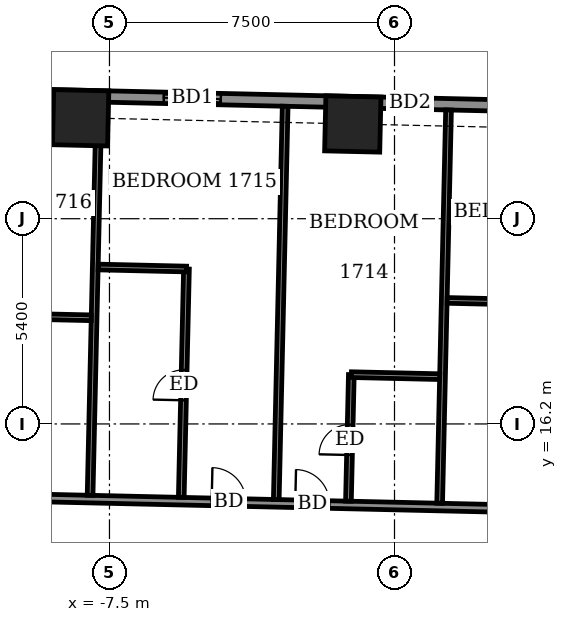
"""IFC4 building model, lengths in metres.
Left out: names, types, materials, properties, quantities, classifications, styles, units other than length and angle.
Written with IfcOpenShell. Run it as: python <this file> out.ifc"""

import sys

from ifc_helpers import new_model, si_unit, direction, frame, frame_2d, origin, origin_2d, place, context, subcontext, project, spatial, rectangle, extrude, element, fill, save


model = new_model("IFC4")
c1 = context("Model", 3, precision=1e-05, world=origin(), true_north=direction((0.0, 1.0)))
c2 = subcontext(c1, "Body", "Model", "MODEL_VIEW")
j1 = project(units=[si_unit("LENGTHUNIT", "METRE"), si_unit("PLANEANGLEUNIT", "RADIAN")], contexts=[c1])
p1 = place(None, origin())
s1 = spatial("IfcSite", under=j1, at=p1, CompositionType="ELEMENT")
p2 = place(p1, origin())
s2 = spatial("IfcBuilding", under=s1, at=p2, CompositionType="ELEMENT")
p3 = place(p2, frame((0.0, 0.0, 71.1)))
s3 = spatial("IfcBuildingStorey", under=s2, at=p3, CompositionType="ELEMENT", Elevation=71.1)
for number, where, z_axis, x_axis in (
    (1, (-1.097, 24.093, -0.55), (0.0, 0.0, 1.0), (-1.0, 0.023, 0.0)),
    (2, (-8.259, 24.255, -0.55), (0.0, 0.0, 1.0), (-1.0, 0.023, 0.0)),
):
    element("IfcColumn", number, at=place(p3, frame(where, z_axis=z_axis, x_axis=x_axis)), inside=s3, PredefinedType="COLUMN", context=c2, shape_type="SweptSolid", body=[
        extrude(rectangle(XDim=1.45, YDim=1.45, at=origin_2d()), origin(), (0.0, 0.0, 1.0), 3.6),
    ])
p4 = place(p3, frame((27.407, 24.021, 0.0), z_axis=(0.0, 0.0, 1.0), x_axis=(-0.99974239923, 0.022696589664, 0.0)))
e3 = element("IfcWall", 3, at=p4, inside=s3, PredefinedType="SOLIDWALL", context=c2, shape_type="SweptSolid", body=[
    extrude(rectangle(XDim=49.836, YDim=0.3, at=frame_2d((24.918, 0.0))), origin(), (0.0, 0.0, 1.0), 3.05),
])
p5 = place(p4, frame((2.998, 0.0, 0.0)))
e4 = element("IfcOpeningElement", 4, at=p5, cuts=e3, PredefinedType="OPENING", context=c2, shape_type="SweptSolid", body=[
    extrude(rectangle(XDim=1.5, YDim=2.4, at=frame_2d((0.75, 1.2))), frame((0.0, 0.16, 0.0), z_axis=(0.0, -1.0, 0.0), x_axis=(1.0, 0.0, 0.0)), (0.0, 0.0, 1.0), 0.32),
])
p6 = place(p4, frame((9.086, 0.0, 0.0)))
e5 = element("IfcOpeningElement", 5, at=p6, cuts=e3, PredefinedType="OPENING", context=c2, shape_type="SweptSolid", body=[
    extrude(rectangle(XDim=1.5, YDim=2.4, at=frame_2d((0.75, 1.2))), frame((0.0, 0.16, 0.0), z_axis=(0.0, -1.0, 0.0), x_axis=(1.0, 0.0, 0.0)), (0.0, 0.0, 1.0), 0.32),
])
p7 = place(p4, frame((15.017, 0.0, 0.0)))
e6 = element("IfcOpeningElement", 6, at=p7, cuts=e3, PredefinedType="OPENING", context=c2, shape_type="SweptSolid", body=[
    extrude(rectangle(XDim=1.5, YDim=2.4, at=frame_2d((0.75, 1.2))), frame((0.0, 0.16, 0.0), z_axis=(0.0, -1.0, 0.0), x_axis=(1.0, 0.0, 0.0)), (0.0, 0.0, 1.0), 0.32),
])
p8 = place(p4, frame((18.124, 0.0, 0.0)))
e7 = element("IfcOpeningElement", 7, at=p8, cuts=e3, PredefinedType="OPENING", context=c2, shape_type="SweptSolid", body=[
    extrude(rectangle(XDim=1.5, YDim=2.4, at=frame_2d((0.75, 1.2))), frame((0.0, 0.16, 0.0), z_axis=(0.0, -1.0, 0.0), x_axis=(1.0, 0.0, 0.0)), (0.0, 0.0, 1.0), 0.32),
])
p9 = place(p4, frame((23.149, 0.0, 0.0)))
e8 = element("IfcOpeningElement", 8, at=p9, cuts=e3, PredefinedType="OPENING", context=c2, shape_type="SweptSolid", body=[
    extrude(rectangle(XDim=1.5, YDim=2.4, at=frame_2d((0.75, 1.2))), frame((0.0, 0.16, 0.0), z_axis=(0.0, -1.0, 0.0), x_axis=(1.0, 0.0, 0.0)), (0.0, 0.0, 1.0), 0.32),
])
p10 = place(p4, frame((26.405, 0.0, 0.0)))
e9 = element("IfcOpeningElement", 9, at=p10, cuts=e3, PredefinedType="OPENING", context=c2, shape_type="SweptSolid", body=[
    extrude(rectangle(XDim=1.2, YDim=2.4, at=frame_2d((0.6, 1.2))), frame((0.0, 0.16, 0.0), z_axis=(0.0, -1.0, 0.0), x_axis=(1.0, 0.0, 0.0)), (0.0, 0.0, 1.0), 0.32),
])
p11 = place(p4, frame((31.986, 0.0, 0.0)))
e10 = element("IfcOpeningElement", 10, at=p11, cuts=e3, PredefinedType="OPENING", context=c2, shape_type="SweptSolid", body=[
    extrude(rectangle(XDim=1.5, YDim=2.4, at=frame_2d((0.75, 1.2))), frame((0.0, 0.16, 0.0), z_axis=(0.0, -1.0, 0.0), x_axis=(1.0, 0.0, 0.0)), (0.0, 0.0, 1.0), 0.32),
])
p12 = place(p4, frame((37.211, 0.0, 0.0)))
e11 = element("IfcOpeningElement", 11, at=p12, cuts=e3, PredefinedType="OPENING", context=c2, shape_type="SweptSolid", body=[
    extrude(rectangle(XDim=1.5, YDim=2.4, at=frame_2d((0.75, 1.2))), frame((0.0, 0.16, 0.0), z_axis=(0.0, -1.0, 0.0), x_axis=(1.0, 0.0, 0.0)), (0.0, 0.0, 1.0), 0.32),
])
p13 = place(p4, frame((40.317, 0.0, 0.0)))
e12 = element("IfcOpeningElement", 12, at=p13, cuts=e3, PredefinedType="OPENING", context=c2, shape_type="SweptSolid", body=[
    extrude(rectangle(XDim=1.5, YDim=2.4, at=frame_2d((0.75, 1.2))), frame((0.0, 0.16, 0.0), z_axis=(0.0, -1.0, 0.0), x_axis=(1.0, 0.0, 0.0)), (0.0, 0.0, 1.0), 0.32),
])
p14 = place(p4, frame((45.431, 0.0, 0.9)))
e13 = element("IfcOpeningElement", 13, at=p14, cuts=e3, PredefinedType="OPENING", context=c2, shape_type="SweptSolid", body=[
    extrude(rectangle(XDim=2.4, YDim=1.5, at=frame_2d((1.2, 0.75))), frame((0.0, 0.16, 0.0), z_axis=(0.0, -1.0, 0.0), x_axis=(1.0, 0.0, 0.0)), (0.0, 0.0, 1.0), 0.32),
])
p15 = place(p3, frame((-25.481, 14.619, 0.0), z_axis=(0.0, 0.0, 1.0), x_axis=(0.999742349682, -0.022698772048, 0.0)))
e14 = element("IfcWall", 14, at=p15, inside=s3, PredefinedType="PARTITIONING", context=c2, shape_type="SweptSolid", body=[
    extrude(rectangle(XDim=54.886, YDim=0.2, at=frame_2d((27.443, 0.0))), origin(), (0.0, 0.0, 1.0), 3.05),
])
p16 = place(p15, frame((52.093, 0.0, 0.0)))
e15 = element("IfcOpeningElement", 15, at=p16, cuts=e14, PredefinedType="OPENING", context=c2, shape_type="SweptSolid", body=[
    extrude(rectangle(XDim=1.0, YDim=2.1, at=frame_2d((0.5, 1.05))), frame((0.0, 0.11, 0.0), z_axis=(0.0, -1.0, 0.0), x_axis=(1.0, 0.0, 0.0)), (0.0, 0.0, 1.0), 0.22),
])
p17 = place(p15, frame((46.325, 0.0, 0.0)))
e16 = element("IfcOpeningElement", 16, at=p17, cuts=e14, PredefinedType="OPENING", context=c2, shape_type="SweptSolid", body=[
    extrude(rectangle(XDim=0.9, YDim=2.1, at=frame_2d((0.45, 1.05))), frame((0.0, 0.11, 0.0), z_axis=(0.0, -1.0, 0.0), x_axis=(1.0, 0.0, 0.0)), (0.0, 0.0, 1.0), 0.22),
])
p18 = place(p15, frame((41.275, 0.0, 0.0)))
e17 = element("IfcOpeningElement", 17, at=p18, cuts=e14, PredefinedType="OPENING", context=c2, shape_type="SweptSolid", body=[
    extrude(rectangle(XDim=0.9, YDim=2.1, at=frame_2d((0.45, 1.05))), frame((0.0, 0.11, 0.0), z_axis=(0.0, -1.0, 0.0), x_axis=(1.0, 0.0, 0.0)), (0.0, 0.0, 1.0), 0.22),
])
p19 = place(p15, frame((38.875, 0.0, 0.0)))
e18 = element("IfcOpeningElement", 18, at=p19, cuts=e14, PredefinedType="OPENING", context=c2, shape_type="SweptSolid", body=[
    extrude(rectangle(XDim=0.9, YDim=2.1, at=frame_2d((0.45, 1.05))), frame((0.0, 0.11, 0.0), z_axis=(0.0, -1.0, 0.0), x_axis=(1.0, 0.0, 0.0)), (0.0, 0.0, 1.0), 0.22),
])
p20 = place(p15, frame((31.95, 0.0, 0.0)))
e19 = element("IfcOpeningElement", 19, at=p20, cuts=e14, PredefinedType="OPENING", context=c2, shape_type="SweptSolid", body=[
    extrude(rectangle(XDim=0.9, YDim=2.1, at=frame_2d((0.45, 1.05))), frame((0.0, 0.11, 0.0), z_axis=(0.0, -1.0, 0.0), x_axis=(1.0, 0.0, 0.0)), (0.0, 0.0, 1.0), 0.22),
])
p21 = place(p15, frame((29.8, 0.0, 0.0)))
e20 = element("IfcOpeningElement", 20, at=p21, cuts=e14, PredefinedType="OPENING", context=c2, shape_type="SweptSolid", body=[
    extrude(rectangle(XDim=0.9, YDim=2.1, at=frame_2d((0.45, 1.05))), frame((0.0, 0.11, 0.0), z_axis=(0.0, -1.0, 0.0), x_axis=(1.0, 0.0, 0.0)), (0.0, 0.0, 1.0), 0.22),
])
p22 = place(p15, frame((22.875, 0.0, 0.0)))
e21 = element("IfcOpeningElement", 21, at=p22, cuts=e14, PredefinedType="OPENING", context=c2, shape_type="SweptSolid", body=[
    extrude(rectangle(XDim=0.9, YDim=2.1, at=frame_2d((0.45, 1.05))), frame((0.0, 0.11, 0.0), z_axis=(0.0, -1.0, 0.0), x_axis=(1.0, 0.0, 0.0)), (0.0, 0.0, 1.0), 0.22),
])
p23 = place(p15, frame((20.675, 0.0, 0.0)))
e22 = element("IfcOpeningElement", 22, at=p23, cuts=e14, PredefinedType="OPENING", context=c2, shape_type="SweptSolid", body=[
    extrude(rectangle(XDim=0.9, YDim=2.1, at=frame_2d((0.45, 1.05))), frame((0.0, 0.11, 0.0), z_axis=(0.0, -1.0, 0.0), x_axis=(1.0, 0.0, 0.0)), (0.0, 0.0, 1.0), 0.22),
])
p24 = place(p15, frame((13.525, 0.0, 0.0)))
e23 = element("IfcOpeningElement", 23, at=p24, cuts=e14, PredefinedType="OPENING", context=c2, shape_type="SweptSolid", body=[
    extrude(rectangle(XDim=0.9, YDim=2.1, at=frame_2d((0.45, 1.05))), frame((0.0, 0.11, 0.0), z_axis=(0.0, -1.0, 0.0), x_axis=(1.0, 0.0, 0.0)), (0.0, 0.0, 1.0), 0.22),
])
p25 = place(p15, frame((11.275, 0.0, 0.0)))
e24 = element("IfcOpeningElement", 24, at=p25, cuts=e14, PredefinedType="OPENING", context=c2, shape_type="SweptSolid", body=[
    extrude(rectangle(XDim=0.9, YDim=2.1, at=frame_2d((0.45, 1.05))), frame((0.0, 0.11, 0.0), z_axis=(0.0, -1.0, 0.0), x_axis=(1.0, 0.0, 0.0)), (0.0, 0.0, 1.0), 0.22),
])
p26 = place(p15, frame((3.079, 0.0, 0.0)))
e25 = element("IfcOpeningElement", 25, at=p26, cuts=e14, PredefinedType="OPENING", context=c2, shape_type="SweptSolid", body=[
    extrude(rectangle(XDim=1.0, YDim=2.1, at=frame_2d((0.5, 1.05))), frame((0.0, 0.11, 0.0), z_axis=(0.0, -1.0, 0.0), x_axis=(1.0, 0.0, 0.0)), (0.0, 0.0, 1.0), 0.22),
])
p27 = place(p3, frame((-8.01, 14.322, 0.0), z_axis=(0.0, 0.0, 1.0), x_axis=(0.022714440015, 0.999741993824, 0.0)))
e26 = element("IfcWall", 26, at=p27, inside=s3, PredefinedType="PARTITIONING", context=c2, shape_type="SweptSolid", body=[
    extrude(rectangle(XDim=10.351, YDim=0.15, at=frame_2d((5.175, 0.0))), origin(), (0.0, 0.0, 1.0), 3.05),
])
p28 = place(p3, frame((-5.611, 14.268, 0.0), z_axis=(0.0, 0.0, 1.0), x_axis=(0.022791542349, 0.999740239061, 0.0)))
e27 = element("IfcWall", 27, at=p28, inside=s3, PredefinedType="PARTITIONING", context=c2, shape_type="SweptSolid", body=[
    extrude(rectangle(XDim=6.009, YDim=0.15, at=frame_2d((3.005, 0.0))), origin(), (0.0, 0.0, 1.0), 3.05),
])
p29 = place(p28, frame((2.555, 0.0, 0.0)))
e28 = element("IfcOpeningElement", 28, at=p29, cuts=e27, PredefinedType="OPENING", context=c2, shape_type="SweptSolid", body=[
    extrude(rectangle(XDim=0.8, YDim=2.1, at=frame_2d((0.4, 1.05))), frame((0.0, 0.085, 0.0), z_axis=(0.0, -1.0, 0.0), x_axis=(1.0, 0.0, 0.0)), (0.0, 0.0, 1.0), 0.17),
])
p30 = place(p3, frame((-3.111, 14.211, 0.0), z_axis=(0.0, 0.0, 1.0), x_axis=(0.022621740073, 0.999744095695, 0.0)))
e29 = element("IfcWall", 29, at=p30, inside=s3, PredefinedType="PARTITIONING", context=c2, shape_type="SweptSolid", body=[
    extrude(rectangle(XDim=10.35, YDim=0.15, at=frame_2d((5.175, 0.0))), origin(), (0.0, 0.0, 1.0), 2.55),
])
p31 = place(p3, frame((-1.212, 14.168, 0.0), z_axis=(0.0, 0.0, 1.0), x_axis=(0.022801345323, 0.99974001553, 0.0)))
e30 = element("IfcWall", 30, at=p31, inside=s3, PredefinedType="PARTITIONING", context=c2, shape_type="SweptSolid", body=[
    extrude(rectangle(XDim=3.33, YDim=0.15, at=frame_2d((1.665, 0.0))), origin(), (0.0, 0.0, 1.0), 3.05),
])
p32 = place(p31, frame((1.215, 0.0, 0.0)))
e31 = element("IfcOpeningElement", 31, at=p32, cuts=e30, PredefinedType="OPENING", context=c2, shape_type="SweptSolid", body=[
    extrude(rectangle(XDim=0.8, YDim=2.1, at=frame_2d((0.4, 1.05))), frame((0.0, 0.085, 0.0), z_axis=(0.0, -1.0, 0.0), x_axis=(1.0, 0.0, 0.0)), (0.0, 0.0, 1.0), 0.17),
])
p33 = place(p3, frame((1.188, 14.113, 0.0), z_axis=(0.0, 0.0, 1.0), x_axis=(0.022620139731, 0.999744131905, 0.0)))
e32 = element("IfcWall", 32, at=p33, inside=s3, PredefinedType="PARTITIONING", context=c2, shape_type="SweptSolid", body=[
    extrude(rectangle(XDim=10.351, YDim=0.15, at=frame_2d((5.175, 0.0))), origin(), (0.0, 0.0, 1.0), 2.55),
])
p34 = place(p3, frame((-1.134, 17.497, 0.0), z_axis=(0.0, 0.0, 1.0), x_axis=(0.999740260747, -0.02279059109, 0.0)))
e33 = element("IfcWall", 33, at=p34, inside=s3, PredefinedType="PARTITIONING", context=c2, shape_type="SweptSolid", body=[
    extrude(rectangle(XDim=2.324, YDim=0.15, at=frame_2d((1.162, 0.0))), origin(), (0.0, 0.0, 1.0), 3.05),
])
p35 = place(p3, frame((-10.302, 19.045, 0.0), z_axis=(0.0, 0.0, 1.0), x_axis=(0.999749954681, -0.022361308448, 0.0)))
e34 = element("IfcWall", 34, at=p35, inside=s3, PredefinedType="PARTITIONING", context=c2, shape_type="SweptSolid", body=[
    extrude(rectangle(XDim=2.325, YDim=0.15, at=frame_2d((1.163, 0.0))), origin(), (0.0, 0.0, 1.0), 3.05),
])
p36 = place(p3, frame((1.386, 19.45, 0.0), z_axis=(0.0, 0.0, 1.0), x_axis=(0.999749744571, -0.022370700241, 0.0)))
e35 = element("IfcWall", 35, at=p36, inside=s3, PredefinedType="PARTITIONING", context=c2, shape_type="SweptSolid", body=[
    extrude(rectangle(XDim=2.324, YDim=0.15, at=frame_2d((1.162, 0.0))), origin(), (0.0, 0.0, 1.0), 3.05),
])
p37 = place(p3, frame((-7.797, 20.329, 0.0), z_axis=(0.0, 0.0, 1.0), x_axis=(0.999738137323, -0.022883548292, 0.0)))
e36 = element("IfcWall", 36, at=p37, inside=s3, PredefinedType="PARTITIONING", context=c2, shape_type="SweptSolid", body=[
    extrude(rectangle(XDim=2.326, YDim=0.15, at=frame_2d((1.163, 0.0))), origin(), (0.0, 0.0, 1.0), 3.05),
])
p38 = place(p10, origin())
e37 = element("IfcDoor", 37, at=p38, inside=s3, OperationType="SLIDING_TO_LEFT", PredefinedType="DOOR", context=c2, shape_type="SweptSolid", body=[
    extrude(rectangle(XDim=1.2, YDim=2.4, at=frame_2d((0.6, 1.2))), frame((0.0, 0.025, 0.0), z_axis=(0.0, -1.0, 0.0), x_axis=(1.0, 0.0, 0.0)), (0.0, 0.0, 1.0), 0.05),
])
fill(e9, e37)
p39 = place(p11, origin())
e38 = element("IfcDoor", 38, at=p39, inside=s3, OperationType="SLIDING_TO_LEFT", PredefinedType="DOOR", context=c2, shape_type="SweptSolid", body=[
    extrude(rectangle(XDim=1.5, YDim=2.4, at=frame_2d((0.75, 1.2))), frame((0.0, 0.025, 0.0), z_axis=(0.0, -1.0, 0.0), x_axis=(1.0, 0.0, 0.0)), (0.0, 0.0, 1.0), 0.05),
])
fill(e10, e38)
p40 = place(p22, origin())
e39 = element("IfcDoor", 39, at=p40, inside=s3, OperationType="SINGLE_SWING_RIGHT", PredefinedType="DOOR", context=c2, shape_type="SweptSolid", body=[
    extrude(rectangle(XDim=0.9, YDim=2.1, at=frame_2d((0.45, 1.05))), frame((0.0, 0.025, 0.0), z_axis=(0.0, -1.0, 0.0), x_axis=(1.0, 0.0, 0.0)), (0.0, 0.0, 1.0), 0.05),
])
fill(e21, e39)
p41 = place(p32, origin())
e40 = element("IfcDoor", 40, at=p41, inside=s3, OperationType="SINGLE_SWING_RIGHT", PredefinedType="DOOR", context=c2, shape_type="SweptSolid", body=[
    extrude(rectangle(XDim=0.8, YDim=2.1, at=frame_2d((0.4, 1.05))), frame((0.0, 0.025, 0.0), z_axis=(0.0, -1.0, 0.0), x_axis=(1.0, 0.0, 0.0)), (0.0, 0.0, 1.0), 0.05),
])
fill(e31, e40)
p42 = place(p23, origin())
e41 = element("IfcDoor", 41, at=p42, inside=s3, OperationType="SINGLE_SWING_LEFT", PredefinedType="DOOR", context=c2, shape_type="SweptSolid", body=[
    extrude(rectangle(XDim=0.9, YDim=2.1, at=frame_2d((0.45, 1.05))), frame((0.0, 0.025, 0.0), z_axis=(0.0, -1.0, 0.0), x_axis=(1.0, 0.0, 0.0)), (0.0, 0.0, 1.0), 0.05),
])
fill(e22, e41)
p43 = place(p29, origin())
e42 = element("IfcDoor", 42, at=p43, inside=s3, OperationType="SINGLE_SWING_LEFT", PredefinedType="DOOR", context=c2, shape_type="SweptSolid", body=[
    extrude(rectangle(XDim=0.8, YDim=2.1, at=frame_2d((0.4, 1.05))), frame((0.0, 0.025, 0.0), z_axis=(0.0, -1.0, 0.0), x_axis=(1.0, 0.0, 0.0)), (0.0, 0.0, 1.0), 0.05),
])
fill(e28, e42)
save(model, sys.argv[1])
